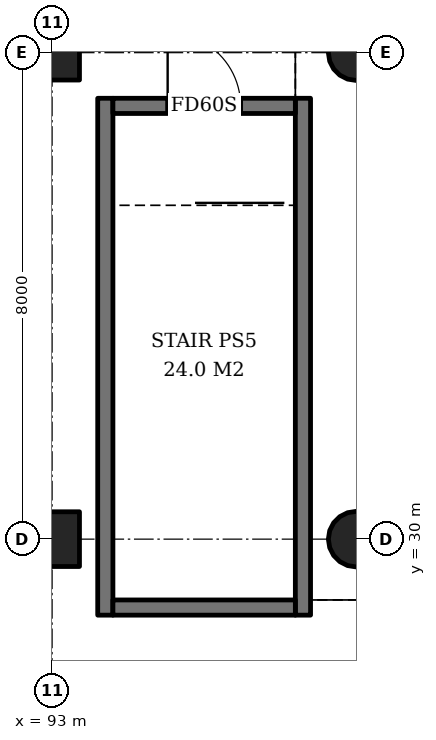
"""IFC4 building model, lengths in metres.
Left out: names, types, materials, properties, quantities, classifications, styles, units other than length and angle.
Written with IfcOpenShell. Run it as: python <this file> out.ifc"""

import sys

from ifc_helpers import new_model, si_unit, direction, frame, frame_2d, origin, origin_2d, place, context, subcontext, project, spatial, rectangle, hollow_circle, extrude, element, fill, save


model = new_model("IFC4")
c1 = context("Model", 3, precision=1e-05, world=origin(), true_north=direction((0.0, 1.0)))
c2 = subcontext(c1, "Body", "Model", "MODEL_VIEW")
j1 = project(units=[si_unit("LENGTHUNIT", "METRE"), si_unit("PLANEANGLEUNIT", "RADIAN")], contexts=[c1])
p1 = place(None, origin())
s1 = spatial("IfcSite", under=j1, at=p1, CompositionType="ELEMENT")
p2 = place(p1, origin())
s2 = spatial("IfcBuilding", under=s1, at=p2, CompositionType="ELEMENT")
p3 = place(p2, frame((0.0, 0.0, 16.0)))
s3 = spatial("IfcBuildingStorey", under=s2, at=p3, CompositionType="ELEMENT", Elevation=16.0)
for number, where, z_axis, x_axis in (
    (1, (93.0, 30.0, 0.0), (0.0, 0.0, 1.0), (1.0, 0.0, 0.0)),
    (2, (93.0, 38.0, 0.0), (0.0, 0.0, 1.0), (1.0, 0.0, 0.0)),
):
    element("IfcColumn", number, at=place(p3, frame(where, z_axis=z_axis, x_axis=x_axis)), inside=s3, PredefinedType="COLUMN", context=c2, shape_type="SweptSolid", body=[
        extrude(rectangle(XDim=0.9, YDim=0.9, at=origin_2d()), origin(), (0.0, 0.0, 1.0), 5.0),
    ])
for number, where, z_axis, x_axis in (
    (3, (98.0, 30.0, 0.0), (0.0, 0.0, 1.0), (1.0, 0.0, 0.0)),
    (4, (98.0, 38.0, 0.0), (0.0, 0.0, 1.0), (1.0, 0.0, 0.0)),
):
    element("IfcColumn", number, at=place(p3, frame(where, z_axis=z_axis, x_axis=x_axis)), inside=s3, PredefinedType="COLUMN", context=c2, shape_type="SweptSolid", body=[
        extrude(hollow_circle(Radius=0.457, WallThickness=0.03, at=origin_2d()), origin(), (0.0, 0.0, 1.0), 5.0),
    ])
for number, where, z_axis, x_axis in (
    (5, (93.875, 28.75, 0.0), (0.0, 0.0, 1.0), (0.0, 1.0, 0.0)),
    (6, (97.125, 28.75, 0.0), (0.0, 0.0, 1.0), (0.0, 1.0, 0.0)),
):
    element("IfcWall", number, at=place(p3, frame(where, z_axis=z_axis, x_axis=x_axis)), inside=s3, PredefinedType="SOLIDWALL", context=c2, shape_type="SweptSolid", body=[
        extrude(rectangle(XDim=8.5, YDim=0.25, at=frame_2d((4.25, 0.0))), origin(), (0.0, 0.0, 1.0), 4.7),
    ])
p4 = place(p3, frame((94.0, 28.875, 0.0), z_axis=(0.0, 0.0, 1.0), x_axis=(1.0, 0.0, 0.0)))
e7 = element("IfcWall", 7, at=p4, inside=s3, PredefinedType="SOLIDWALL", context=c2, shape_type="SweptSolid", body=[
    extrude(rectangle(XDim=3.0, YDim=0.25, at=frame_2d((1.5, 0.0))), origin(), (0.0, 0.0, 1.0), 4.7),
])
p5 = place(p3, frame((94.0, 37.125, 0.0), z_axis=(0.0, 0.0, 1.0), x_axis=(1.0, 0.0, 0.0)))
e8 = element("IfcWall", 8, at=p5, inside=s3, PredefinedType="SOLIDWALL", context=c2, shape_type="SweptSolid", body=[
    extrude(rectangle(XDim=3.0, YDim=0.25, at=frame_2d((1.5, 0.0))), origin(), (0.0, 0.0, 1.0), 4.7),
])
p6 = place(p5, frame((0.9, 0.0, 0.0)))
e9 = element("IfcOpeningElement", 9, at=p6, cuts=e8, PredefinedType="OPENING", context=c2, shape_type="SweptSolid", body=[
    extrude(rectangle(XDim=1.2, YDim=2.1, at=frame_2d((0.6, 1.05))), frame((0.0, 0.135, 0.0), z_axis=(0.0, -1.0, 0.0), x_axis=(1.0, 0.0, 0.0)), (0.0, 0.0, 1.0), 0.27),
])
p7 = place(p6, origin())
e10 = element("IfcDoor", 10, at=p7, inside=s3, OperationType="SINGLE_SWING_LEFT", PredefinedType="DOOR", context=c2, shape_type="SweptSolid", body=[
    extrude(rectangle(XDim=1.2, YDim=2.1, at=frame_2d((0.6, 1.05))), frame((0.0, 0.025, 0.0), z_axis=(0.0, -1.0, 0.0), x_axis=(1.0, 0.0, 0.0)), (0.0, 0.0, 1.0), 0.05),
])
fill(e9, e10)
save(model, sys.argv[1])
